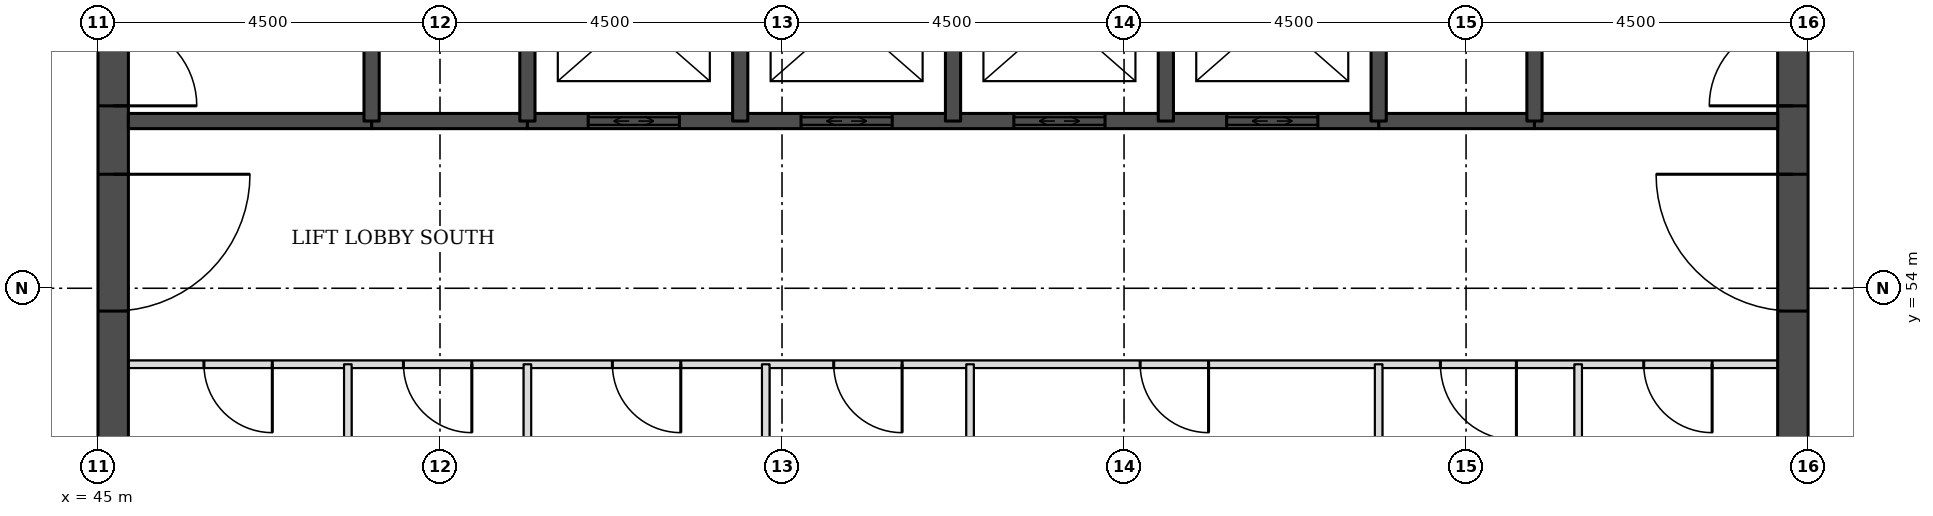
"""IFC4 building model, lengths in metres.
Left out: names, types, materials, properties, quantities, classifications, styles, units other than length and angle.
Written with IfcOpenShell. Run it as: python <this file> out.ifc"""

import sys

from ifc_helpers import new_model, si_unit, direction, frame, frame_2d, origin, place, context, subcontext, project, spatial, rectangle, extrude, element, fill, save


model = new_model("IFC4")
c1 = context("Model", 3, precision=1e-05, world=origin(), true_north=direction((0.0, 1.0)))
c2 = subcontext(c1, "Body", "Model", "MODEL_VIEW")
j1 = project(units=[si_unit("LENGTHUNIT", "METRE"), si_unit("PLANEANGLEUNIT", "RADIAN")], contexts=[c1])
p1 = place(None, origin())
s1 = spatial("IfcSite", under=j1, at=p1, CompositionType="ELEMENT")
p2 = place(p1, origin())
s2 = spatial("IfcBuilding", under=s1, at=p2, CompositionType="ELEMENT")
p3 = place(p2, frame((0.0, 0.0, 184.7)))
s3 = spatial("IfcBuildingStorey", under=s2, at=p3, CompositionType="ELEMENT", Elevation=184.7)
p4 = place(p3, frame((45.2, 49.5, 0.0), z_axis=(0.0, 0.0, 1.0), x_axis=(0.0, 1.0, 0.0)))
e1 = element("IfcWall", 1, at=p4, inside=s3, PredefinedType="SHEAR", context=c2, shape_type="SweptSolid", body=[
    extrude(rectangle(XDim=22.5, YDim=0.4, at=frame_2d((11.25, 0.0))), origin(), (0.0, 0.0, 1.0), 3.7),
])
p5 = place(p4, frame((4.2, 0.0, 0.0)))
e2 = element("IfcOpeningElement", 2, at=p5, cuts=e1, PredefinedType="OPENING", context=c2, shape_type="SweptSolid", body=[
    extrude(rectangle(XDim=1.8, YDim=2.1, at=frame_2d((0.9, 1.05))), frame((0.0, 0.21, 0.0), z_axis=(0.0, -1.0, 0.0), x_axis=(1.0, 0.0, 0.0)), (0.0, 0.0, 1.0), 0.42),
])
p6 = place(p4, frame((6.9, 0.0, 0.0)))
e3 = element("IfcOpeningElement", 3, at=p6, cuts=e1, PredefinedType="OPENING", context=c2, shape_type="SweptSolid", body=[
    extrude(rectangle(XDim=1.1, YDim=2.1, at=frame_2d((0.55, 1.05))), frame((0.0, 0.21, 0.0), z_axis=(0.0, -1.0, 0.0), x_axis=(1.0, 0.0, 0.0)), (0.0, 0.0, 1.0), 0.42),
])
p7 = place(p4, frame((13.6, 0.0, 0.0)))
e4 = element("IfcOpeningElement", 4, at=p7, cuts=e1, PredefinedType="OPENING", context=c2, shape_type="SweptSolid", body=[
    extrude(rectangle(XDim=1.1, YDim=2.1, at=frame_2d((0.55, 1.05))), frame((0.0, 0.21, 0.0), z_axis=(0.0, -1.0, 0.0), x_axis=(1.0, 0.0, 0.0)), (0.0, 0.0, 1.0), 0.42),
])
p8 = place(p4, frame((16.5, 0.0, 0.0)))
e5 = element("IfcOpeningElement", 5, at=p8, cuts=e1, PredefinedType="OPENING", context=c2, shape_type="SweptSolid", body=[
    extrude(rectangle(XDim=1.8, YDim=2.1, at=frame_2d((0.9, 1.05))), frame((0.0, 0.21, 0.0), z_axis=(0.0, -1.0, 0.0), x_axis=(1.0, 0.0, 0.0)), (0.0, 0.0, 1.0), 0.42),
])
p9 = place(p3, frame((67.3, 49.5, 0.0), z_axis=(0.0, 0.0, 1.0), x_axis=(0.0, 1.0, 0.0)))
e6 = element("IfcWall", 6, at=p9, inside=s3, PredefinedType="SHEAR", context=c2, shape_type="SweptSolid", body=[
    extrude(rectangle(XDim=22.5, YDim=0.4, at=frame_2d((11.25, 0.0))), origin(), (0.0, 0.0, 1.0), 3.7),
])
p10 = place(p9, frame((4.2, 0.0, 0.0)))
e7 = element("IfcOpeningElement", 7, at=p10, cuts=e6, PredefinedType="OPENING", context=c2, shape_type="SweptSolid", body=[
    extrude(rectangle(XDim=1.8, YDim=2.1, at=frame_2d((0.9, 1.05))), frame((0.0, 0.21, 0.0), z_axis=(0.0, -1.0, 0.0), x_axis=(1.0, 0.0, 0.0)), (0.0, 0.0, 1.0), 0.42),
])
p11 = place(p9, frame((6.9, 0.0, 0.0)))
e8 = element("IfcOpeningElement", 8, at=p11, cuts=e6, PredefinedType="OPENING", context=c2, shape_type="SweptSolid", body=[
    extrude(rectangle(XDim=1.1, YDim=2.1, at=frame_2d((0.55, 1.05))), frame((0.0, 0.21, 0.0), z_axis=(0.0, -1.0, 0.0), x_axis=(1.0, 0.0, 0.0)), (0.0, 0.0, 1.0), 0.42),
])
p12 = place(p9, frame((13.6, 0.0, 0.0)))
e9 = element("IfcOpeningElement", 9, at=p12, cuts=e6, PredefinedType="OPENING", context=c2, shape_type="SweptSolid", body=[
    extrude(rectangle(XDim=1.1, YDim=2.1, at=frame_2d((0.55, 1.05))), frame((0.0, 0.21, 0.0), z_axis=(0.0, -1.0, 0.0), x_axis=(1.0, 0.0, 0.0)), (0.0, 0.0, 1.0), 0.42),
])
p13 = place(p9, frame((16.5, 0.0, 0.0)))
e10 = element("IfcOpeningElement", 10, at=p13, cuts=e6, PredefinedType="OPENING", context=c2, shape_type="SweptSolid", body=[
    extrude(rectangle(XDim=1.8, YDim=2.1, at=frame_2d((0.9, 1.05))), frame((0.0, 0.21, 0.0), z_axis=(0.0, -1.0, 0.0), x_axis=(1.0, 0.0, 0.0)), (0.0, 0.0, 1.0), 0.42),
])
p14 = place(p3, frame((45.4, 53.0, 0.0), z_axis=(0.0, 0.0, 1.0), x_axis=(1.0, 0.0, 0.0)))
e11 = element("IfcWall", 11, at=p14, inside=s3, PredefinedType="PARTITIONING", context=c2, shape_type="SweptSolid", body=[
    extrude(rectangle(XDim=21.7, YDim=0.1, at=frame_2d((10.85, 0.0))), origin(), (0.0, 0.0, 1.0), 3.55),
])
p15 = place(p14, frame((19.938, 0.0, 0.0)))
e12 = element("IfcOpeningElement", 12, at=p15, cuts=e11, PredefinedType="OPENING", context=c2, shape_type="SweptSolid", body=[
    extrude(rectangle(XDim=0.9, YDim=2.1, at=frame_2d((0.45, 1.05))), frame((0.0, 0.06, 0.0), z_axis=(0.0, -1.0, 0.0), x_axis=(1.0, 0.0, 0.0)), (0.0, 0.0, 1.0), 0.12),
])
p16 = place(p14, frame((17.262, 0.0, 0.0)))
e13 = element("IfcOpeningElement", 13, at=p16, cuts=e11, PredefinedType="OPENING", context=c2, shape_type="SweptSolid", body=[
    extrude(rectangle(XDim=1.0, YDim=2.1, at=frame_2d((0.5, 1.05))), frame((0.0, 0.06, 0.0), z_axis=(0.0, -1.0, 0.0), x_axis=(1.0, 0.0, 0.0)), (0.0, 0.0, 1.0), 0.12),
])
p17 = place(p14, frame((0.994, 0.0, 0.0)))
e14 = element("IfcOpeningElement", 14, at=p17, cuts=e11, PredefinedType="OPENING", context=c2, shape_type="SweptSolid", body=[
    extrude(rectangle(XDim=0.9, YDim=2.1, at=frame_2d((0.45, 1.05))), frame((0.0, 0.06, 0.0), z_axis=(0.0, -1.0, 0.0), x_axis=(1.0, 0.0, 0.0)), (0.0, 0.0, 1.0), 0.12),
])
p18 = place(p14, frame((3.619, 0.0, 0.0)))
e15 = element("IfcOpeningElement", 15, at=p18, cuts=e11, PredefinedType="OPENING", context=c2, shape_type="SweptSolid", body=[
    extrude(rectangle(XDim=0.9, YDim=2.1, at=frame_2d((0.45, 1.05))), frame((0.0, 0.06, 0.0), z_axis=(0.0, -1.0, 0.0), x_axis=(1.0, 0.0, 0.0)), (0.0, 0.0, 1.0), 0.12),
])
p19 = place(p14, frame((6.368, 0.0, 0.0)))
e16 = element("IfcOpeningElement", 16, at=p19, cuts=e11, PredefinedType="OPENING", context=c2, shape_type="SweptSolid", body=[
    extrude(rectangle(XDim=0.9, YDim=2.1, at=frame_2d((0.45, 1.05))), frame((0.0, 0.06, 0.0), z_axis=(0.0, -1.0, 0.0), x_axis=(1.0, 0.0, 0.0)), (0.0, 0.0, 1.0), 0.12),
])
p20 = place(p14, frame((9.28, 0.0, 0.0)))
e17 = element("IfcOpeningElement", 17, at=p20, cuts=e11, PredefinedType="OPENING", context=c2, shape_type="SweptSolid", body=[
    extrude(rectangle(XDim=0.9, YDim=2.1, at=frame_2d((0.45, 1.05))), frame((0.0, 0.06, 0.0), z_axis=(0.0, -1.0, 0.0), x_axis=(1.0, 0.0, 0.0)), (0.0, 0.0, 1.0), 0.12),
])
p21 = place(p14, frame((13.312, 0.0, 0.0)))
e18 = element("IfcOpeningElement", 18, at=p21, cuts=e11, PredefinedType="OPENING", context=c2, shape_type="SweptSolid", body=[
    extrude(rectangle(XDim=0.9, YDim=2.1, at=frame_2d((0.45, 1.05))), frame((0.0, 0.06, 0.0), z_axis=(0.0, -1.0, 0.0), x_axis=(1.0, 0.0, 0.0)), (0.0, 0.0, 1.0), 0.12),
])
for number, where, z_axis, x_axis in (
    (19, (48.6, 56.2, 0.0), (0.0, 0.0, 1.0), (1.0, 0.0, 0.0)),
    (20, (61.85, 56.2, 0.0), (0.0, 0.0, 1.0), (1.0, 0.0, 0.0)),
):
    element("IfcWall", number, at=place(p3, frame(where, z_axis=z_axis, x_axis=x_axis)), inside=s3, PredefinedType="SOLIDWALL", context=c2, shape_type="SweptSolid", body=[
        extrude(rectangle(XDim=2.05, YDim=0.2, at=frame_2d((1.025, 0.0))), origin(), (0.0, 0.0, 1.0), 3.55),
    ])
p22 = place(p3, frame((45.4, 56.2, 0.0), z_axis=(0.0, 0.0, 1.0), x_axis=(1.0, 0.0, 0.0)))
e21 = element("IfcWall", 21, at=p22, inside=s3, PredefinedType="SOLIDWALL", context=c2, shape_type="SweptSolid", body=[
    extrude(rectangle(XDim=3.2, YDim=0.2, at=frame_2d((1.6, 0.0))), origin(), (0.0, 0.0, 1.0), 3.55),
])
p23 = place(p3, frame((50.65, 56.2, 0.0), z_axis=(0.0, 0.0, 1.0), x_axis=(1.0, 0.0, 0.0)))
e22 = element("IfcWall", 22, at=p23, inside=s3, PredefinedType="SOLIDWALL", context=c2, shape_type="SweptSolid", body=[
    extrude(rectangle(XDim=11.2, YDim=0.2, at=frame_2d((5.6, 0.0))), origin(), (0.0, 0.0, 1.0), 3.55),
])
p24 = place(p23, frame((0.8, 0.0, 0.0)))
e23 = element("IfcOpeningElement", 23, at=p24, cuts=e22, PredefinedType="OPENING", context=c2, shape_type="SweptSolid", body=[
    extrude(rectangle(XDim=1.2, YDim=2.1, at=frame_2d((0.6, 1.05))), frame((0.0, 0.11, 0.0), z_axis=(0.0, -1.0, 0.0), x_axis=(1.0, 0.0, 0.0)), (0.0, 0.0, 1.0), 0.22),
])
p25 = place(p23, frame((3.6, 0.0, 0.0)))
e24 = element("IfcOpeningElement", 24, at=p25, cuts=e22, PredefinedType="OPENING", context=c2, shape_type="SweptSolid", body=[
    extrude(rectangle(XDim=1.2, YDim=2.1, at=frame_2d((0.6, 1.05))), frame((0.0, 0.11, 0.0), z_axis=(0.0, -1.0, 0.0), x_axis=(1.0, 0.0, 0.0)), (0.0, 0.0, 1.0), 0.22),
])
p26 = place(p23, frame((6.4, 0.0, 0.0)))
e25 = element("IfcOpeningElement", 25, at=p26, cuts=e22, PredefinedType="OPENING", context=c2, shape_type="SweptSolid", body=[
    extrude(rectangle(XDim=1.2, YDim=2.1, at=frame_2d((0.6, 1.05))), frame((0.0, 0.11, 0.0), z_axis=(0.0, -1.0, 0.0), x_axis=(1.0, 0.0, 0.0)), (0.0, 0.0, 1.0), 0.22),
])
p27 = place(p23, frame((9.2, 0.0, 0.0)))
e26 = element("IfcOpeningElement", 26, at=p27, cuts=e22, PredefinedType="OPENING", context=c2, shape_type="SweptSolid", body=[
    extrude(rectangle(XDim=1.2, YDim=2.1, at=frame_2d((0.6, 1.05))), frame((0.0, 0.11, 0.0), z_axis=(0.0, -1.0, 0.0), x_axis=(1.0, 0.0, 0.0)), (0.0, 0.0, 1.0), 0.22),
])
p28 = place(p3, frame((63.9, 56.2, 0.0), z_axis=(0.0, 0.0, 1.0), x_axis=(1.0, 0.0, 0.0)))
e27 = element("IfcWall", 27, at=p28, inside=s3, PredefinedType="SOLIDWALL", context=c2, shape_type="SweptSolid", body=[
    extrude(rectangle(XDim=3.2, YDim=0.2, at=frame_2d((1.6, 0.0))), origin(), (0.0, 0.0, 1.0), 3.55),
])
p29 = place(p3, frame((48.288, 49.9, 0.0), z_axis=(0.0, 0.0, 1.0), x_axis=(0.0, 1.0, 0.0)))
e28 = element("IfcWall", 28, at=p29, inside=s3, PredefinedType="PARTITIONING", context=c2, shape_type="SweptSolid", body=[
    extrude(rectangle(XDim=3.1, YDim=0.1, at=frame_2d((1.55, 0.0))), origin(), (0.0, 0.0, 1.0), 3.55),
])
p30 = place(p3, frame((48.6, 56.2, 0.0), z_axis=(0.0, 0.0, 1.0), x_axis=(0.0, 1.0, 0.0)))
e29 = element("IfcWall", 29, at=p30, inside=s3, PredefinedType="SOLIDWALL", context=c2, shape_type="SweptSolid", body=[
    extrude(rectangle(XDim=5.8, YDim=0.2, at=frame_2d((2.9, 0.0))), origin(), (0.0, 0.0, 1.0), 3.55),
])
p31 = place(p3, frame((50.65, 49.9, 0.0), z_axis=(0.0, 0.0, 1.0), x_axis=(0.0, 1.0, 0.0)))
e30 = element("IfcWall", 30, at=p31, inside=s3, PredefinedType="PARTITIONING", context=c2, shape_type="SweptSolid", body=[
    extrude(rectangle(XDim=3.1, YDim=0.1, at=frame_2d((1.55, 0.0))), origin(), (0.0, 0.0, 1.0), 3.55),
])
for number, where, z_axis, x_axis in (
    (31, (50.65, 56.2, 0.0), (0.0, 0.0, 1.0), (0.0, 1.0, 0.0)),
    (32, (53.45, 56.2, 0.0), (0.0, 0.0, 1.0), (0.0, 1.0, 0.0)),
):
    element("IfcWall", number, at=place(p3, frame(where, z_axis=z_axis, x_axis=x_axis)), inside=s3, PredefinedType="SOLIDWALL", context=c2, shape_type="SweptSolid", body=[
        extrude(rectangle(XDim=2.8, YDim=0.2, at=frame_2d((1.4, 0.0))), origin(), (0.0, 0.0, 1.0), 3.55),
    ])
p32 = place(p3, frame((53.786, 49.9, 0.0), z_axis=(0.0, 0.0, 1.0), x_axis=(0.0, 1.0, 0.0)))
e33 = element("IfcWall", 33, at=p32, inside=s3, PredefinedType="PARTITIONING", context=c2, shape_type="SweptSolid", body=[
    extrude(rectangle(XDim=3.1, YDim=0.1, at=frame_2d((1.55, 0.0))), origin(), (0.0, 0.0, 1.0), 3.55),
])
p33 = place(p3, frame((56.25, 56.2, 0.0), z_axis=(0.0, 0.0, 1.0), x_axis=(0.0, 1.0, 0.0)))
e34 = element("IfcWall", 34, at=p33, inside=s3, PredefinedType="SOLIDWALL", context=c2, shape_type="SweptSolid", body=[
    extrude(rectangle(XDim=2.8, YDim=0.2, at=frame_2d((1.4, 0.0))), origin(), (0.0, 0.0, 1.0), 3.55),
])
p34 = place(p3, frame((56.474, 49.9, 0.0), z_axis=(0.0, 0.0, 1.0), x_axis=(0.0, 1.0, 0.0)))
e35 = element("IfcWall", 35, at=p34, inside=s3, PredefinedType="PARTITIONING", context=c2, shape_type="SweptSolid", body=[
    extrude(rectangle(XDim=3.1, YDim=0.1, at=frame_2d((1.55, 0.0))), origin(), (0.0, 0.0, 1.0), 3.55),
])
p35 = place(p3, frame((59.05, 56.2, 0.0), z_axis=(0.0, 0.0, 1.0), x_axis=(0.0, 1.0, 0.0)))
e36 = element("IfcWall", 36, at=p35, inside=s3, PredefinedType="SOLIDWALL", context=c2, shape_type="SweptSolid", body=[
    extrude(rectangle(XDim=2.8, YDim=0.2, at=frame_2d((1.4, 0.0))), origin(), (0.0, 0.0, 1.0), 3.55),
])
p36 = place(p3, frame((61.85, 49.9, 0.0), z_axis=(0.0, 0.0, 1.0), x_axis=(0.0, 1.0, 0.0)))
e37 = element("IfcWall", 37, at=p36, inside=s3, PredefinedType="PARTITIONING", context=c2, shape_type="SweptSolid", body=[
    extrude(rectangle(XDim=3.1, YDim=0.1, at=frame_2d((1.55, 0.0))), origin(), (0.0, 0.0, 1.0), 3.55),
])
p37 = place(p3, frame((61.85, 56.2, 0.0), z_axis=(0.0, 0.0, 1.0), x_axis=(0.0, 1.0, 0.0)))
e38 = element("IfcWall", 38, at=p37, inside=s3, PredefinedType="SOLIDWALL", context=c2, shape_type="SweptSolid", body=[
    extrude(rectangle(XDim=2.8, YDim=0.2, at=frame_2d((1.4, 0.0))), origin(), (0.0, 0.0, 1.0), 3.55),
])
p38 = place(p3, frame((63.9, 56.2, 0.0), z_axis=(0.0, 0.0, 1.0), x_axis=(0.0, 1.0, 0.0)))
e39 = element("IfcWall", 39, at=p38, inside=s3, PredefinedType="SOLIDWALL", context=c2, shape_type="SweptSolid", body=[
    extrude(rectangle(XDim=5.8, YDim=0.2, at=frame_2d((2.9, 0.0))), origin(), (0.0, 0.0, 1.0), 3.55),
])
p39 = place(p3, frame((64.475, 49.9, 0.0), z_axis=(0.0, 0.0, 1.0), x_axis=(0.0, 1.0, 0.0)))
e40 = element("IfcWall", 40, at=p39, inside=s3, PredefinedType="PARTITIONING", context=c2, shape_type="SweptSolid", body=[
    extrude(rectangle(XDim=3.1, YDim=0.1, at=frame_2d((1.55, 0.0))), origin(), (0.0, 0.0, 1.0), 3.55),
])
p40 = place(p24, origin())
e41 = element("IfcDoor", 41, at=p40, inside=s3, OperationType="DOUBLE_DOOR_SLIDING", PredefinedType="DOOR", context=c2, shape_type="SweptSolid", body=[
    extrude(rectangle(XDim=1.2, YDim=2.1, at=frame_2d((0.6, 1.05))), frame((0.0, 0.025, 0.0), z_axis=(0.0, -1.0, 0.0), x_axis=(1.0, 0.0, 0.0)), (0.0, 0.0, 1.0), 0.05),
])
fill(e23, e41)
p41 = place(p25, origin())
e42 = element("IfcDoor", 42, at=p41, inside=s3, OperationType="DOUBLE_DOOR_SLIDING", PredefinedType="DOOR", context=c2, shape_type="SweptSolid", body=[
    extrude(rectangle(XDim=1.2, YDim=2.1, at=frame_2d((0.6, 1.05))), frame((0.0, 0.025, 0.0), z_axis=(0.0, -1.0, 0.0), x_axis=(1.0, 0.0, 0.0)), (0.0, 0.0, 1.0), 0.05),
])
fill(e24, e42)
p42 = place(p26, origin())
e43 = element("IfcDoor", 43, at=p42, inside=s3, OperationType="DOUBLE_DOOR_SLIDING", PredefinedType="DOOR", context=c2, shape_type="SweptSolid", body=[
    extrude(rectangle(XDim=1.2, YDim=2.1, at=frame_2d((0.6, 1.05))), frame((0.0, 0.025, 0.0), z_axis=(0.0, -1.0, 0.0), x_axis=(1.0, 0.0, 0.0)), (0.0, 0.0, 1.0), 0.05),
])
fill(e25, e43)
p43 = place(p27, origin())
e44 = element("IfcDoor", 44, at=p43, inside=s3, OperationType="DOUBLE_DOOR_SLIDING", PredefinedType="DOOR", context=c2, shape_type="SweptSolid", body=[
    extrude(rectangle(XDim=1.2, YDim=2.1, at=frame_2d((0.6, 1.05))), frame((0.0, 0.025, 0.0), z_axis=(0.0, -1.0, 0.0), x_axis=(1.0, 0.0, 0.0)), (0.0, 0.0, 1.0), 0.05),
])
fill(e26, e44)
p44 = place(p5, frame((1.8, 0.0, 0.0), z_axis=(0.0, 0.0, 1.0), x_axis=(-1.0, 0.0, 0.0)))
e45 = element("IfcDoor", 45, at=p44, inside=s3, OperationType="SINGLE_SWING_LEFT", PredefinedType="DOOR", context=c2, shape_type="SweptSolid", body=[
    extrude(rectangle(XDim=1.8, YDim=2.1, at=frame_2d((0.9, 1.05))), frame((0.0, 0.025, 0.0), z_axis=(0.0, -1.0, 0.0), x_axis=(1.0, 0.0, 0.0)), (0.0, 0.0, 1.0), 0.05),
])
fill(e2, e45)
p45 = place(p6, frame((1.1, 0.0, 0.0), z_axis=(0.0, 0.0, 1.0), x_axis=(-1.0, 0.0, 0.0)))
e46 = element("IfcDoor", 46, at=p45, inside=s3, OperationType="SINGLE_SWING_RIGHT", PredefinedType="DOOR", context=c2, shape_type="SweptSolid", body=[
    extrude(rectangle(XDim=1.1, YDim=2.1, at=frame_2d((0.55, 1.05))), frame((0.0, 0.025, 0.0), z_axis=(0.0, -1.0, 0.0), x_axis=(1.0, 0.0, 0.0)), (0.0, 0.0, 1.0), 0.05),
])
fill(e3, e46)
p46 = place(p10, origin())
e47 = element("IfcDoor", 47, at=p46, inside=s3, OperationType="SINGLE_SWING_RIGHT", PredefinedType="DOOR", context=c2, shape_type="SweptSolid", body=[
    extrude(rectangle(XDim=1.8, YDim=2.1, at=frame_2d((0.9, 1.05))), frame((0.0, 0.025, 0.0), z_axis=(0.0, -1.0, 0.0), x_axis=(1.0, 0.0, 0.0)), (0.0, 0.0, 1.0), 0.05),
])
fill(e7, e47)
p47 = place(p11, origin())
e48 = element("IfcDoor", 48, at=p47, inside=s3, OperationType="SINGLE_SWING_LEFT", PredefinedType="DOOR", context=c2, shape_type="SweptSolid", body=[
    extrude(rectangle(XDim=1.1, YDim=2.1, at=frame_2d((0.55, 1.05))), frame((0.0, 0.025, 0.0), z_axis=(0.0, -1.0, 0.0), x_axis=(1.0, 0.0, 0.0)), (0.0, 0.0, 1.0), 0.05),
])
fill(e8, e48)
p48 = place(p15, frame((0.9, 0.0, 0.0), z_axis=(0.0, 0.0, 1.0), x_axis=(-1.0, 0.0, 0.0)))
e49 = element("IfcDoor", 49, at=p48, inside=s3, OperationType="SINGLE_SWING_LEFT", PredefinedType="DOOR", context=c2, shape_type="SweptSolid", body=[
    extrude(rectangle(XDim=0.9, YDim=2.1, at=frame_2d((0.45, 1.05))), frame((0.0, 0.025, 0.0), z_axis=(0.0, -1.0, 0.0), x_axis=(1.0, 0.0, 0.0)), (0.0, 0.0, 1.0), 0.05),
])
fill(e12, e49)
p49 = place(p16, frame((1.0, 0.0, 0.0), z_axis=(0.0, 0.0, 1.0), x_axis=(-1.0, 0.0, 0.0)))
e50 = element("IfcDoor", 50, at=p49, inside=s3, OperationType="SINGLE_SWING_LEFT", PredefinedType="DOOR", context=c2, shape_type="SweptSolid", body=[
    extrude(rectangle(XDim=1.0, YDim=2.1, at=frame_2d((0.5, 1.05))), frame((0.0, 0.025, 0.0), z_axis=(0.0, -1.0, 0.0), x_axis=(1.0, 0.0, 0.0)), (0.0, 0.0, 1.0), 0.05),
])
fill(e13, e50)
p50 = place(p17, frame((0.9, 0.0, 0.0), z_axis=(0.0, 0.0, 1.0), x_axis=(-1.0, 0.0, 0.0)))
e51 = element("IfcDoor", 51, at=p50, inside=s3, OperationType="SINGLE_SWING_LEFT", PredefinedType="DOOR", context=c2, shape_type="SweptSolid", body=[
    extrude(rectangle(XDim=0.9, YDim=2.1, at=frame_2d((0.45, 1.05))), frame((0.0, 0.025, 0.0), z_axis=(0.0, -1.0, 0.0), x_axis=(1.0, 0.0, 0.0)), (0.0, 0.0, 1.0), 0.05),
])
fill(e14, e51)
p51 = place(p18, frame((0.9, 0.0, 0.0), z_axis=(0.0, 0.0, 1.0), x_axis=(-1.0, 0.0, 0.0)))
e52 = element("IfcDoor", 52, at=p51, inside=s3, OperationType="SINGLE_SWING_LEFT", PredefinedType="DOOR", context=c2, shape_type="SweptSolid", body=[
    extrude(rectangle(XDim=0.9, YDim=2.1, at=frame_2d((0.45, 1.05))), frame((0.0, 0.025, 0.0), z_axis=(0.0, -1.0, 0.0), x_axis=(1.0, 0.0, 0.0)), (0.0, 0.0, 1.0), 0.05),
])
fill(e15, e52)
p52 = place(p19, frame((0.9, 0.0, 0.0), z_axis=(0.0, 0.0, 1.0), x_axis=(-1.0, 0.0, 0.0)))
e53 = element("IfcDoor", 53, at=p52, inside=s3, OperationType="SINGLE_SWING_LEFT", PredefinedType="DOOR", context=c2, shape_type="SweptSolid", body=[
    extrude(rectangle(XDim=0.9, YDim=2.1, at=frame_2d((0.45, 1.05))), frame((0.0, 0.025, 0.0), z_axis=(0.0, -1.0, 0.0), x_axis=(1.0, 0.0, 0.0)), (0.0, 0.0, 1.0), 0.05),
])
fill(e16, e53)
p53 = place(p20, frame((0.9, 0.0, 0.0), z_axis=(0.0, 0.0, 1.0), x_axis=(-1.0, 0.0, 0.0)))
e54 = element("IfcDoor", 54, at=p53, inside=s3, OperationType="SINGLE_SWING_LEFT", PredefinedType="DOOR", context=c2, shape_type="SweptSolid", body=[
    extrude(rectangle(XDim=0.9, YDim=2.1, at=frame_2d((0.45, 1.05))), frame((0.0, 0.025, 0.0), z_axis=(0.0, -1.0, 0.0), x_axis=(1.0, 0.0, 0.0)), (0.0, 0.0, 1.0), 0.05),
])
fill(e17, e54)
p54 = place(p21, frame((0.9, 0.0, 0.0), z_axis=(0.0, 0.0, 1.0), x_axis=(-1.0, 0.0, 0.0)))
e55 = element("IfcDoor", 55, at=p54, inside=s3, OperationType="SINGLE_SWING_LEFT", PredefinedType="DOOR", context=c2, shape_type="SweptSolid", body=[
    extrude(rectangle(XDim=0.9, YDim=2.1, at=frame_2d((0.45, 1.05))), frame((0.0, 0.025, 0.0), z_axis=(0.0, -1.0, 0.0), x_axis=(1.0, 0.0, 0.0)), (0.0, 0.0, 1.0), 0.05),
])
fill(e18, e55)
save(model, sys.argv[1])
